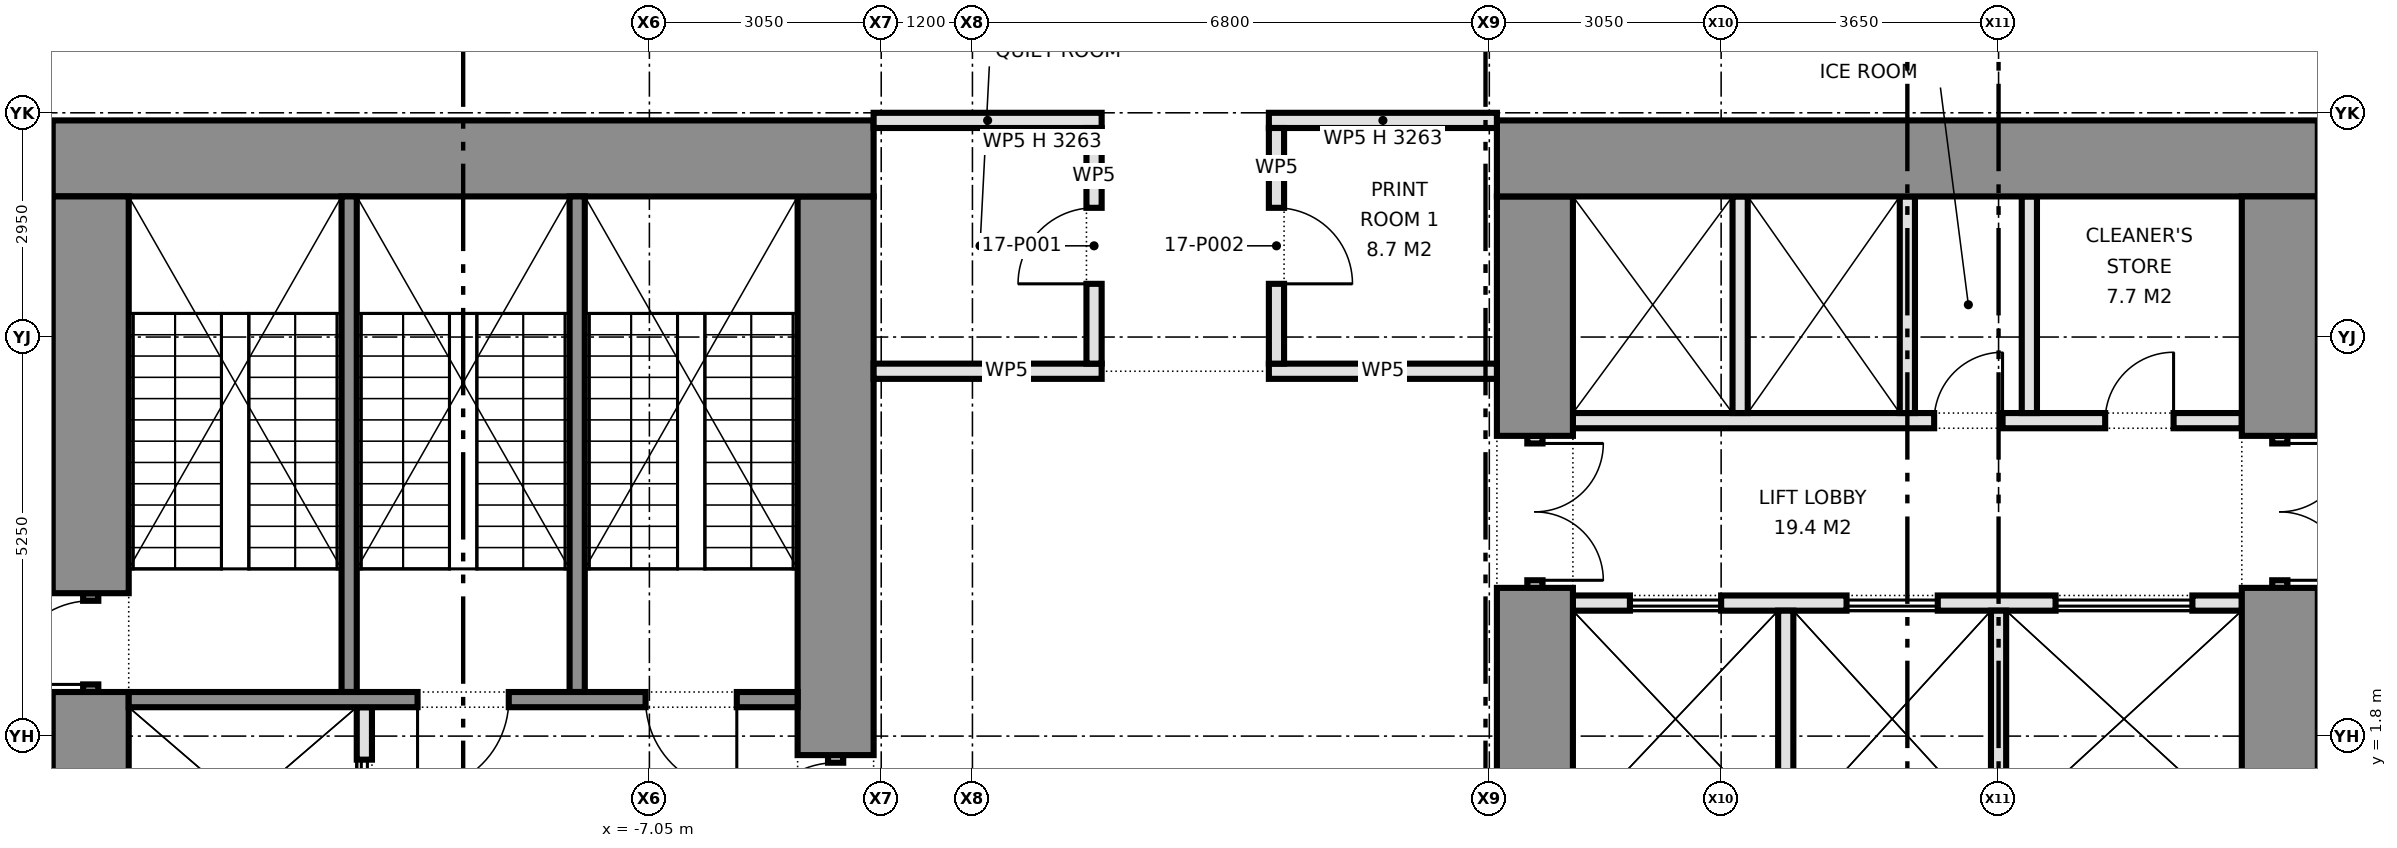
"""IFC4 building model, lengths in metres.
Left out: names, types, materials, properties, quantities, classifications, styles, units other than length and angle.
Written with IfcOpenShell. Run it as: python <this file> out.ifc"""

import sys

from ifc_helpers import new_model, si_unit, direction, frame, frame_2d, origin, place, context, subcontext, project, spatial, rectangle, extrude, element, fill, save


model = new_model("IFC4")
c1 = context("Model", 3, precision=1e-05, world=origin(), true_north=direction((0.0, 1.0)))
c2 = subcontext(c1, "Body", "Model", "MODEL_VIEW")
j1 = project(units=[si_unit("LENGTHUNIT", "METRE"), si_unit("PLANEANGLEUNIT", "RADIAN")], contexts=[c1])
p1 = place(None, origin())
s1 = spatial("IfcSite", under=j1, at=p1, CompositionType="ELEMENT")
p2 = place(p1, origin())
s2 = spatial("IfcBuilding", under=s1, at=p2, CompositionType="ELEMENT")
p3 = place(p2, frame((0.0, 0.0, 77.6)))
s3 = spatial("IfcBuildingStorey", under=s2, at=p3, CompositionType="ELEMENT", Elevation=77.6)
p4 = place(p3, frame((-14.9, 9.4, 0.0), z_axis=(0.0, 0.0, 1.0), x_axis=(1.0, 0.0, 0.0)))
e1 = element("IfcWall", 1, at=p4, inside=s3, PredefinedType="SHEAR", context=c2, shape_type="SweptSolid", body=[
    extrude(rectangle(XDim=10.8, YDim=1.0, at=frame_2d((5.4, 0.0))), origin(), (0.0, 0.0, 1.0), 4.2),
])
p5 = place(p3, frame((-14.4, -3.75, 0.0), z_axis=(0.0, 0.0, 1.0), x_axis=(0.0, 1.0, 0.0)))
e2 = element("IfcWall", 2, at=p5, inside=s3, PredefinedType="SHEAR", context=c2, shape_type="SweptSolid", body=[
    extrude(rectangle(XDim=6.13, YDim=1.0, at=frame_2d((3.065, 0.0))), origin(), (0.0, 0.0, 1.0), 4.2),
])
p6 = place(p3, frame((-14.4, 2.38, 0.0), z_axis=(0.0, 0.0, 1.0), x_axis=(0.0, 1.0, 0.0)))
e3 = element("IfcWall", 3, at=p6, inside=s3, PredefinedType="SHEAR", context=c2, shape_type="SweptSolid", body=[
    extrude(rectangle(XDim=1.3, YDim=0.2, at=frame_2d((0.65, 0.0))), origin(), (0.0, 0.0, 1.0), 2.4),
])
p7 = place(p6, frame((0.1, 0.0, 0.0)))
e4 = element("IfcOpeningElement", 4, at=p7, cuts=e3, PredefinedType="OPENING", context=c2, shape_type="SweptSolid", body=[
    extrude(rectangle(XDim=1.1, YDim=2.1, at=frame_2d((0.55, 1.05))), frame((0.0, 0.11, 0.0), z_axis=(0.0, -1.0, 0.0), x_axis=(1.0, 0.0, 0.0)), (0.0, 0.0, 1.0), 0.22),
])
p8 = place(p3, frame((-14.4, 3.68, 0.0), z_axis=(0.0, 0.0, 1.0), x_axis=(0.0, 1.0, 0.0)))
e5 = element("IfcWall", 5, at=p8, inside=s3, PredefinedType="SHEAR", context=c2, shape_type="SweptSolid", body=[
    extrude(rectangle(XDim=5.22, YDim=1.0, at=frame_2d((2.61, 0.0))), origin(), (0.0, 0.0, 1.0), 4.2),
])
p9 = place(p3, frame((-4.6, 0.25, 0.0), z_axis=(0.0, 0.0, 1.0), x_axis=(0.0, 1.0, 0.0)))
e6 = element("IfcWall", 6, at=p9, inside=s3, PredefinedType="PARTITIONING", context=c2, shape_type="SweptSolid", body=[
    extrude(rectangle(XDim=1.3, YDim=0.2, at=frame_2d((0.65, 0.0))), origin(), (0.0, 0.0, 1.0), 2.4),
])
p10 = place(p9, frame((0.1, 0.0, 0.0)))
e7 = element("IfcOpeningElement", 7, at=p10, cuts=e6, PredefinedType="OPENING", context=c2, shape_type="SweptSolid", body=[
    extrude(rectangle(XDim=1.1, YDim=2.1, at=frame_2d((0.55, 1.05))), frame((0.0, 0.11, 0.0), z_axis=(0.0, -1.0, 0.0), x_axis=(1.0, 0.0, 0.0)), (0.0, 0.0, 1.0), 0.22),
])
p11 = place(p3, frame((-4.6, 1.55, 0.0), z_axis=(0.0, 0.0, 1.0), x_axis=(0.0, 1.0, 0.0)))
e8 = element("IfcWall", 8, at=p11, inside=s3, PredefinedType="SHEAR", context=c2, shape_type="SweptSolid", body=[
    extrude(rectangle(XDim=7.35, YDim=1.0, at=frame_2d((3.675, 0.0))), origin(), (0.0, 0.0, 1.0), 4.2),
])
p12 = place(p3, frame((-10.8, -0.4, 0.0), z_axis=(0.0, 0.0, 1.0), x_axis=(0.0, 1.0, 0.0)))
e9 = element("IfcWall", 9, at=p12, inside=s3, PredefinedType="PARTITIONING", context=c2, shape_type="SweptSolid", body=[
    extrude(rectangle(XDim=2.58, YDim=0.2, at=frame_2d((1.29, 0.0))), origin(), (0.0, 0.0, 1.0), 4.2),
])
p13 = place(p12, frame((0.69, 0.0, 0.0)))
e10 = element("IfcOpeningElement", 10, at=p13, cuts=e9, PredefinedType="OPENING", context=c2, shape_type="SweptSolid", body=[
    extrude(rectangle(XDim=1.2, YDim=2.1, at=frame_2d((0.6, 1.05))), frame((0.0, 0.11, 0.0), z_axis=(0.0, -1.0, 0.0), x_axis=(1.0, 0.0, 0.0)), (0.0, 0.0, 1.0), 0.22),
])
p14 = place(p3, frame((-13.9, 2.28, 0.0), z_axis=(0.0, 0.0, 1.0), x_axis=(1.0, 0.0, 0.0)))
e11 = element("IfcWall", 11, at=p14, inside=s3, PredefinedType="SHEAR", context=c2, shape_type="SweptSolid", body=[
    extrude(rectangle(XDim=8.8, YDim=0.2, at=frame_2d((4.4, 0.0))), origin(), (0.0, 0.0, 1.0), 4.2),
])
p15 = place(p14, frame((3.8, 0.0, 0.0)))
e12 = element("IfcOpeningElement", 12, at=p15, cuts=e11, PredefinedType="OPENING", context=c2, shape_type="SweptSolid", body=[
    extrude(rectangle(XDim=1.2, YDim=2.1, at=frame_2d((0.6, 1.05))), frame((0.0, 0.11, 0.0), z_axis=(0.0, -1.0, 0.0), x_axis=(1.0, 0.0, 0.0)), (0.0, 0.0, 1.0), 0.22),
])
p16 = place(p14, frame((6.8, 0.0, 0.0)))
e13 = element("IfcOpeningElement", 13, at=p16, cuts=e11, PredefinedType="OPENING", context=c2, shape_type="SweptSolid", body=[
    extrude(rectangle(XDim=1.2, YDim=2.1, at=frame_2d((0.6, 1.05))), frame((0.0, 0.11, 0.0), z_axis=(0.0, -1.0, 0.0), x_axis=(1.0, 0.0, 0.0)), (0.0, 0.0, 1.0), 0.22),
])
for number, where, z_axis, x_axis in (
    (14, (-11.0, 2.38, 0.0), (0.0, 0.0, 1.0), (0.0, 1.0, 0.0)),
    (15, (-8.0, 2.38, 0.0), (0.0, 0.0, 1.0), (0.0, 1.0, 0.0)),
):
    element("IfcWall", number, at=place(p3, frame(where, z_axis=z_axis, x_axis=x_axis)), inside=s3, PredefinedType="SHEAR", context=c2, shape_type="SweptSolid", body=[
        extrude(rectangle(XDim=6.52, YDim=0.2, at=frame_2d((3.26, 0.0))), origin(), (0.0, 0.0, 1.0), 4.2),
    ])
p17 = place(p3, frame((14.9, 9.4, 0.0), z_axis=(0.0, 0.0, 1.0), x_axis=(-1.0, 0.0, 0.0)))
e16 = element("IfcWall", 16, at=p17, inside=s3, PredefinedType="SHEAR", context=c2, shape_type="SweptSolid", body=[
    extrude(rectangle(XDim=10.8, YDim=1.0, at=frame_2d((5.4, 0.0))), origin(), (0.0, 0.0, 1.0), 4.2),
])
p18 = place(p3, frame((14.4, 8.9, 0.0), z_axis=(0.0, 0.0, 1.0), x_axis=(0.0, -1.0, 0.0)))
e17 = element("IfcWall", 17, at=p18, inside=s3, PredefinedType="SHEAR", context=c2, shape_type="SweptSolid", body=[
    extrude(rectangle(XDim=3.15, YDim=1.0, at=frame_2d((1.575, 0.0))), origin(), (0.0, 0.0, 1.0), 4.2),
])
p19 = place(p3, frame((14.4, 5.75, 0.0), z_axis=(0.0, 0.0, 1.0), x_axis=(0.0, -1.0, 0.0)))
e18 = element("IfcWall", 18, at=p19, inside=s3, PredefinedType="PARTITIONING", context=c2, shape_type="SweptSolid", body=[
    extrude(rectangle(XDim=2.0, YDim=0.2, at=frame_2d((1.0, 0.0))), origin(), (0.0, 0.0, 1.0), 2.4),
])
p20 = place(p19, frame((0.1, 0.0, 0.0)))
e19 = element("IfcOpeningElement", 19, at=p20, cuts=e18, PredefinedType="OPENING", context=c2, shape_type="SweptSolid", body=[
    extrude(rectangle(XDim=1.8, YDim=2.1, at=frame_2d((0.9, 1.05))), frame((0.0, 0.11, 0.0), z_axis=(0.0, -1.0, 0.0), x_axis=(1.0, 0.0, 0.0)), (0.0, 0.0, 1.0), 0.22),
])
p21 = place(p3, frame((14.4, 3.75, 0.0), z_axis=(0.0, 0.0, 1.0), x_axis=(0.0, -1.0, 0.0)))
e20 = element("IfcWall", 20, at=p21, inside=s3, PredefinedType="SHEAR", context=c2, shape_type="SweptSolid", body=[
    extrude(rectangle(XDim=6.13, YDim=1.0, at=frame_2d((3.065, 0.0))), origin(), (0.0, 0.0, 1.0), 4.2),
])
p22 = place(p3, frame((4.6, 8.9, 0.0), z_axis=(0.0, 0.0, 1.0), x_axis=(0.0, -1.0, 0.0)))
e21 = element("IfcWall", 21, at=p22, inside=s3, PredefinedType="SHEAR", context=c2, shape_type="SweptSolid", body=[
    extrude(rectangle(XDim=3.15, YDim=1.0, at=frame_2d((1.575, 0.0))), origin(), (0.0, 0.0, 1.0), 4.2),
])
p23 = place(p3, frame((4.6, 5.75, 0.0), z_axis=(0.0, 0.0, 1.0), x_axis=(0.0, -1.0, 0.0)))
e22 = element("IfcWall", 22, at=p23, inside=s3, PredefinedType="PARTITIONING", context=c2, shape_type="SweptSolid", body=[
    extrude(rectangle(XDim=2.0, YDim=0.2, at=frame_2d((1.0, 0.0))), origin(), (0.0, 0.0, 1.0), 2.4),
])
p24 = place(p23, frame((0.1, 0.0, 0.0)))
e23 = element("IfcOpeningElement", 23, at=p24, cuts=e22, PredefinedType="OPENING", context=c2, shape_type="SweptSolid", body=[
    extrude(rectangle(XDim=1.8, YDim=2.1, at=frame_2d((0.9, 1.05))), frame((0.0, 0.11, 0.0), z_axis=(0.0, -1.0, 0.0), x_axis=(1.0, 0.0, 0.0)), (0.0, 0.0, 1.0), 0.22),
])
p25 = place(p3, frame((4.6, 3.75, 0.0), z_axis=(0.0, 0.0, 1.0), x_axis=(0.0, -1.0, 0.0)))
e24 = element("IfcWall", 24, at=p25, inside=s3, PredefinedType="SHEAR", context=c2, shape_type="SweptSolid", body=[
    extrude(rectangle(XDim=4.0, YDim=1.0, at=frame_2d((2.0, 0.0))), origin(), (0.0, 0.0, 1.0), 4.2),
])
p26 = place(p3, frame((13.9, 5.95, 0.0), z_axis=(0.0, 0.0, 1.0), x_axis=(-1.0, 0.0, 0.0)))
e25 = element("IfcWall", 25, at=p26, inside=s3, PredefinedType="PARTITIONING", context=c2, shape_type="SweptSolid", body=[
    extrude(rectangle(XDim=8.8, YDim=0.2, at=frame_2d((4.4, 0.0))), origin(), (0.0, 0.0, 1.0), 4.2),
])
p27 = place(p26, frame((0.897, 0.0, 0.0)))
e26 = element("IfcOpeningElement", 26, at=p27, cuts=e25, PredefinedType="OPENING", context=c2, shape_type="SweptSolid", body=[
    extrude(rectangle(XDim=0.9, YDim=2.1, at=frame_2d((0.45, 1.05))), frame((0.0, 0.11, 0.0), z_axis=(0.0, -1.0, 0.0), x_axis=(1.0, 0.0, 0.0)), (0.0, 0.0, 1.0), 0.22),
])
p28 = place(p26, frame((3.147, 0.0, 0.0)))
e27 = element("IfcOpeningElement", 27, at=p28, cuts=e25, PredefinedType="OPENING", context=c2, shape_type="SweptSolid", body=[
    extrude(rectangle(XDim=0.9, YDim=2.1, at=frame_2d((0.45, 1.05))), frame((0.0, 0.11, 0.0), z_axis=(0.0, -1.0, 0.0), x_axis=(1.0, 0.0, 0.0)), (0.0, 0.0, 1.0), 0.22),
])
p29 = place(p3, frame((13.9, 3.55, 0.0), z_axis=(0.0, 0.0, 1.0), x_axis=(-1.0, 0.0, 0.0)))
e28 = element("IfcWall", 28, at=p29, inside=s3, PredefinedType="PARTITIONING", context=c2, shape_type="SweptSolid", body=[
    extrude(rectangle(XDim=8.8, YDim=0.2, at=frame_2d((4.4, 0.0))), origin(), (0.0, 0.0, 1.0), 4.2),
])
p30 = place(p29, frame((0.65, 0.0, 0.0)))
e29 = element("IfcOpeningElement", 29, at=p30, cuts=e28, PredefinedType="OPENING", context=c2, shape_type="SweptSolid", body=[
    extrude(rectangle(XDim=1.8, YDim=2.1, at=frame_2d((0.9, 1.05))), frame((0.0, 0.11, 0.0), z_axis=(0.0, -1.0, 0.0), x_axis=(1.0, 0.0, 0.0)), (0.0, 0.0, 1.0), 0.22),
])
p31 = place(p29, frame((4.0, 0.0, 0.0)))
e30 = element("IfcOpeningElement", 30, at=p31, cuts=e28, PredefinedType="OPENING", context=c2, shape_type="SweptSolid", body=[
    extrude(rectangle(XDim=1.2, YDim=2.1, at=frame_2d((0.6, 1.05))), frame((0.0, 0.11, 0.0), z_axis=(0.0, -1.0, 0.0), x_axis=(1.0, 0.0, 0.0)), (0.0, 0.0, 1.0), 0.22),
])
p32 = place(p29, frame((6.85, 0.0, 0.0)))
e31 = element("IfcOpeningElement", 31, at=p32, cuts=e28, PredefinedType="OPENING", context=c2, shape_type="SweptSolid", body=[
    extrude(rectangle(XDim=1.2, YDim=2.1, at=frame_2d((0.6, 1.05))), frame((0.0, 0.11, 0.0), z_axis=(0.0, -1.0, 0.0), x_axis=(1.0, 0.0, 0.0)), (0.0, 0.0, 1.0), 0.22),
])
for number, where, z_axis, x_axis in (
    (32, (9.5, 8.9, 0.0), (0.0, 0.0, 1.0), (0.0, -1.0, 0.0)),
    (33, (7.3, 8.9, 0.0), (0.0, 0.0, 1.0), (0.0, -1.0, 0.0)),
    (34, (11.105, 8.9, 0.0), (0.0, 0.0, 1.0), (0.0, -1.0, 0.0)),
    (35, (10.7, 3.45, 0.0), (0.0, 0.0, 1.0), (0.0, -1.0, 0.0)),
    (36, (7.9, 3.45, 0.0), (0.0, 0.0, 1.0), (0.0, -1.0, 0.0)),
):
    element("IfcWall", number, at=place(p3, frame(where, z_axis=z_axis, x_axis=x_axis)), inside=s3, PredefinedType="PARTITIONING", context=c2, shape_type="SweptSolid", body=[
        extrude(rectangle(XDim=2.85, YDim=0.2, at=frame_2d((1.425, 0.0))), origin(), (0.0, 0.0, 1.0), 4.2),
    ])
for number, where, z_axis, x_axis in (
    (37, (-4.1, 6.6, 0.0), (0.0, 0.0, 1.0), (1.0, 0.0, 0.0)),
    (38, (1.1, 6.6, 0.0), (0.0, 0.0, 1.0), (1.0, 0.0, 0.0)),
):
    element("IfcWall", number, at=place(p3, frame(where, z_axis=z_axis, x_axis=x_axis)), inside=s3, PredefinedType="PARTITIONING", context=c2, shape_type="SweptSolid", body=[
        extrude(rectangle(XDim=3.0, YDim=0.2, at=frame_2d((1.5, 0.0))), origin(), (0.0, 0.0, 1.0), 4.2),
    ])
for number, where, z_axis, x_axis in (
    (39, (-4.1, 9.9, 0.0), (0.0, 0.0, 1.0), (1.0, 0.0, 0.0)),
    (40, (1.1, 9.9, 0.0), (0.0, 0.0, 1.0), (1.0, 0.0, 0.0)),
):
    element("IfcWall", number, at=place(p3, frame(where, z_axis=z_axis, x_axis=x_axis)), inside=s3, PredefinedType="PARTITIONING", context=c2, shape_type="SweptSolid", body=[
        extrude(rectangle(XDim=3.0, YDim=0.2, at=frame_2d((1.5, 0.0))), origin(), (0.0, 0.0, 1.0), 3.263),
    ])
p33 = place(p3, frame((1.2, 6.7, 0.0), z_axis=(0.0, 0.0, 1.0), x_axis=(0.0, 1.0, 0.0)))
e41 = element("IfcWall", 41, at=p33, inside=s3, PredefinedType="PARTITIONING", context=c2, shape_type="SweptSolid", body=[
    extrude(rectangle(XDim=3.1, YDim=0.2, at=frame_2d((1.55, 0.0))), origin(), (0.0, 0.0, 1.0), 4.2),
])
p34 = place(p33, frame((1.05, 0.0, 0.0)))
e42 = element("IfcOpeningElement", 42, at=p34, cuts=e41, PredefinedType="OPENING", context=c2, shape_type="SweptSolid", body=[
    extrude(rectangle(XDim=1.0, YDim=2.1, at=frame_2d((0.5, 1.05))), frame((0.0, 0.11, 0.0), z_axis=(0.0, -1.0, 0.0), x_axis=(1.0, 0.0, 0.0)), (0.0, 0.0, 1.0), 0.22),
])
p35 = place(p3, frame((-1.2, 6.7, 0.0), z_axis=(0.0, 0.0, 1.0), x_axis=(0.0, 1.0, 0.0)))
e43 = element("IfcWall", 43, at=p35, inside=s3, PredefinedType="PARTITIONING", context=c2, shape_type="SweptSolid", body=[
    extrude(rectangle(XDim=3.1, YDim=0.2, at=frame_2d((1.55, 0.0))), origin(), (0.0, 0.0, 1.0), 4.2),
])
p36 = place(p35, frame((1.05, 0.0, 0.0)))
e44 = element("IfcOpeningElement", 44, at=p36, cuts=e43, PredefinedType="OPENING", context=c2, shape_type="SweptSolid", body=[
    extrude(rectangle(XDim=1.0, YDim=2.1, at=frame_2d((0.5, 1.05))), frame((0.0, 0.11, 0.0), z_axis=(0.0, -1.0, 0.0), x_axis=(1.0, 0.0, 0.0)), (0.0, 0.0, 1.0), 0.22),
])
p37 = place(p7, origin())
e45 = element("IfcDoor", 45, at=p37, inside=s3, OperationType="SINGLE_SWING_LEFT", PredefinedType="DOOR", context=c2, shape_type="SweptSolid", body=[
    extrude(rectangle(XDim=1.1, YDim=2.1, at=frame_2d((0.55, 1.05))), frame((0.0, 0.025, 0.0), z_axis=(0.0, -1.0, 0.0), x_axis=(1.0, 0.0, 0.0)), (0.0, 0.0, 1.0), 0.05),
])
fill(e4, e45)
p38 = place(p10, origin())
e46 = element("IfcDoor", 46, at=p38, inside=s3, OperationType="SINGLE_SWING_LEFT", PredefinedType="DOOR", context=c2, shape_type="SweptSolid", body=[
    extrude(rectangle(XDim=1.1, YDim=2.1, at=frame_2d((0.55, 1.05))), frame((0.0, 0.025, 0.0), z_axis=(0.0, -1.0, 0.0), x_axis=(1.0, 0.0, 0.0)), (0.0, 0.0, 1.0), 0.05),
])
fill(e7, e46)
p39 = place(p13, origin())
e47 = element("IfcDoor", 47, at=p39, inside=s3, OperationType="DOUBLE_DOOR_SLIDING", PredefinedType="DOOR", context=c2, shape_type="SweptSolid", body=[
    extrude(rectangle(XDim=1.2, YDim=2.1, at=frame_2d((0.6, 1.05))), frame((0.0, 0.025, 0.0), z_axis=(0.0, -1.0, 0.0), x_axis=(1.0, 0.0, 0.0)), (0.0, 0.0, 1.0), 0.05),
])
fill(e10, e47)
p40 = place(p15, frame((1.2, 0.0, 0.0), z_axis=(0.0, 0.0, 1.0), x_axis=(-1.0, 0.0, 0.0)))
e48 = element("IfcDoor", 48, at=p40, inside=s3, OperationType="SINGLE_SWING_RIGHT", PredefinedType="DOOR", context=c2, shape_type="SweptSolid", body=[
    extrude(rectangle(XDim=1.2, YDim=2.1, at=frame_2d((0.6, 1.05))), frame((0.0, 0.025, 0.0), z_axis=(0.0, -1.0, 0.0), x_axis=(1.0, 0.0, 0.0)), (0.0, 0.0, 1.0), 0.05),
])
fill(e12, e48)
p41 = place(p16, frame((1.2, 0.0, 0.0), z_axis=(0.0, 0.0, 1.0), x_axis=(-1.0, 0.0, 0.0)))
e49 = element("IfcDoor", 49, at=p41, inside=s3, OperationType="SINGLE_SWING_LEFT", PredefinedType="DOOR", context=c2, shape_type="SweptSolid", body=[
    extrude(rectangle(XDim=1.2, YDim=2.1, at=frame_2d((0.6, 1.05))), frame((0.0, 0.025, 0.0), z_axis=(0.0, -1.0, 0.0), x_axis=(1.0, 0.0, 0.0)), (0.0, 0.0, 1.0), 0.05),
])
fill(e13, e49)
p42 = place(p20, origin())
e50 = element("IfcDoor", 50, at=p42, inside=s3, OperationType="DOUBLE_DOOR_SINGLE_SWING", PredefinedType="DOOR", context=c2, shape_type="SweptSolid", body=[
    extrude(rectangle(XDim=1.8, YDim=2.1, at=frame_2d((0.9, 1.05))), frame((0.0, 0.025, 0.0), z_axis=(0.0, -1.0, 0.0), x_axis=(1.0, 0.0, 0.0)), (0.0, 0.0, 1.0), 0.05),
])
fill(e19, e50)
p43 = place(p24, origin())
e51 = element("IfcDoor", 51, at=p43, inside=s3, OperationType="DOUBLE_DOOR_SINGLE_SWING", PredefinedType="DOOR", context=c2, shape_type="SweptSolid", body=[
    extrude(rectangle(XDim=1.8, YDim=2.1, at=frame_2d((0.9, 1.05))), frame((0.0, 0.025, 0.0), z_axis=(0.0, -1.0, 0.0), x_axis=(1.0, 0.0, 0.0)), (0.0, 0.0, 1.0), 0.05),
])
fill(e23, e51)
p44 = place(p30, origin())
e52 = element("IfcDoor", 52, at=p44, inside=s3, OperationType="DOUBLE_DOOR_SLIDING", PredefinedType="DOOR", context=c2, shape_type="SweptSolid", body=[
    extrude(rectangle(XDim=1.8, YDim=2.1, at=frame_2d((0.9, 1.05))), frame((0.0, 0.025, 0.0), z_axis=(0.0, -1.0, 0.0), x_axis=(1.0, 0.0, 0.0)), (0.0, 0.0, 1.0), 0.05),
])
fill(e29, e52)
p45 = place(p31, origin())
e53 = element("IfcDoor", 53, at=p45, inside=s3, OperationType="DOUBLE_DOOR_SLIDING", PredefinedType="DOOR", context=c2, shape_type="SweptSolid", body=[
    extrude(rectangle(XDim=1.2, YDim=2.1, at=frame_2d((0.6, 1.05))), frame((0.0, 0.025, 0.0), z_axis=(0.0, -1.0, 0.0), x_axis=(1.0, 0.0, 0.0)), (0.0, 0.0, 1.0), 0.05),
])
fill(e30, e53)
p46 = place(p32, origin())
e54 = element("IfcDoor", 54, at=p46, inside=s3, OperationType="DOUBLE_DOOR_SLIDING", PredefinedType="DOOR", context=c2, shape_type="SweptSolid", body=[
    extrude(rectangle(XDim=1.2, YDim=2.1, at=frame_2d((0.6, 1.05))), frame((0.0, 0.025, 0.0), z_axis=(0.0, -1.0, 0.0), x_axis=(1.0, 0.0, 0.0)), (0.0, 0.0, 1.0), 0.05),
])
fill(e31, e54)
p47 = place(p27, frame((0.9, 0.0, 0.0), z_axis=(0.0, 0.0, 1.0), x_axis=(-1.0, 0.0, 0.0)))
e55 = element("IfcDoor", 55, at=p47, inside=s3, OperationType="SINGLE_SWING_RIGHT", PredefinedType="DOOR", context=c2, shape_type="SweptSolid", body=[
    extrude(rectangle(XDim=0.9, YDim=2.1, at=frame_2d((0.45, 1.05))), frame((0.0, 0.025, 0.0), z_axis=(0.0, -1.0, 0.0), x_axis=(1.0, 0.0, 0.0)), (0.0, 0.0, 1.0), 0.05),
])
fill(e26, e55)
p48 = place(p28, frame((0.9, 0.0, 0.0), z_axis=(0.0, 0.0, 1.0), x_axis=(-1.0, 0.0, 0.0)))
e56 = element("IfcDoor", 56, at=p48, inside=s3, OperationType="SINGLE_SWING_RIGHT", PredefinedType="DOOR", context=c2, shape_type="SweptSolid", body=[
    extrude(rectangle(XDim=0.9, YDim=2.1, at=frame_2d((0.45, 1.05))), frame((0.0, 0.025, 0.0), z_axis=(0.0, -1.0, 0.0), x_axis=(1.0, 0.0, 0.0)), (0.0, 0.0, 1.0), 0.05),
])
fill(e27, e56)
p49 = place(p36, origin())
e57 = element("IfcDoor", 57, at=p49, inside=s3, OperationType="SINGLE_SWING_LEFT", PredefinedType="DOOR", context=c2, shape_type="SweptSolid", body=[
    extrude(rectangle(XDim=1.0, YDim=2.1, at=frame_2d((0.5, 1.05))), frame((0.0, 0.025, 0.0), z_axis=(0.0, -1.0, 0.0), x_axis=(1.0, 0.0, 0.0)), (0.0, 0.0, 1.0), 0.05),
])
fill(e44, e57)
p50 = place(p34, frame((1.0, 0.0, 0.0), z_axis=(0.0, 0.0, 1.0), x_axis=(-1.0, 0.0, 0.0)))
e58 = element("IfcDoor", 58, at=p50, inside=s3, OperationType="SINGLE_SWING_RIGHT", PredefinedType="DOOR", context=c2, shape_type="SweptSolid", body=[
    extrude(rectangle(XDim=1.0, YDim=2.1, at=frame_2d((0.5, 1.05))), frame((0.0, 0.025, 0.0), z_axis=(0.0, -1.0, 0.0), x_axis=(1.0, 0.0, 0.0)), (0.0, 0.0, 1.0), 0.05),
])
fill(e42, e58)
save(model, sys.argv[1])
